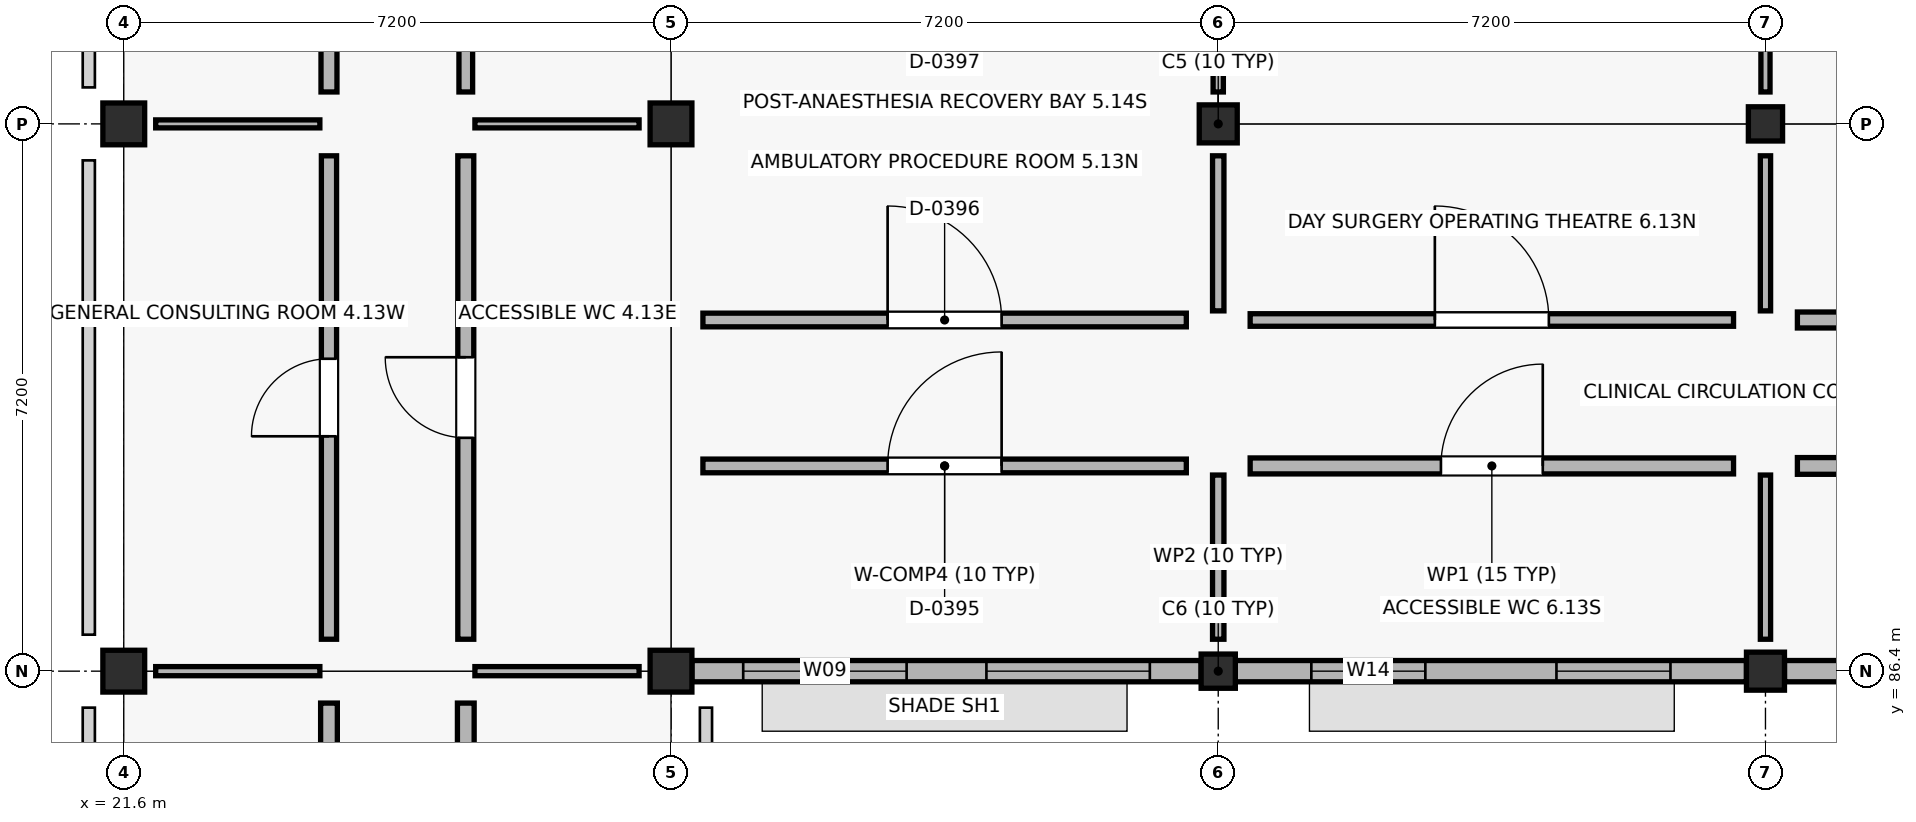
"""IFC4 building model, lengths in metres.
Left out: names, types, materials, properties, quantities, classifications, styles, units other than length and angle.
Written with IfcOpenShell. Run it as: python <this file> out.ifc"""

import sys

from ifc_helpers import new_model, si_unit, direction, frame, frame_2d, origin, origin_2d, place, context, subcontext, project, spatial, rectangle, extrude, element, fill, save


model = new_model("IFC4")
c1 = context("Model", 3, precision=1e-05, world=origin(), true_north=direction((0.0, 1.0)))
c2 = subcontext(c1, "Body", "Model", "MODEL_VIEW")
j1 = project(units=[si_unit("LENGTHUNIT", "METRE"), si_unit("PLANEANGLEUNIT", "RADIAN")], contexts=[c1])
p1 = place(None, origin())
s1 = spatial("IfcSite", under=j1, at=p1, CompositionType="ELEMENT")
p2 = place(p1, origin())
s2 = spatial("IfcBuilding", under=s1, at=p2, CompositionType="ELEMENT")
p3 = place(p2, frame((0.0, 0.0, 9.0)))
s3 = spatial("IfcBuildingStorey", under=s2, at=p3, CompositionType="ELEMENT", Elevation=9.0)
for number, where, z_axis, x_axis in (
    (1, (21.6, 86.4, 0.0), (0.0, 0.0, 1.0), (1.0, 0.0, 0.0)),
    (2, (21.6, 93.6, 0.0), (0.0, 0.0, 1.0), (1.0, 0.0, 0.0)),
    (3, (28.8, 86.4, 0.0), (0.0, 0.0, 1.0), (1.0, 0.0, 0.0)),
    (4, (28.8, 93.6, 0.0), (0.0, 0.0, 1.0), (1.0, 0.0, 0.0)),
):
    element("IfcColumn", number, at=place(p3, frame(where, z_axis=z_axis, x_axis=x_axis)), inside=s3, PredefinedType="COLUMN", context=c2, shape_type="SweptSolid", body=[
        extrude(rectangle(XDim=0.55, YDim=0.55, at=origin_2d()), origin(), (0.0, 0.0, 1.0), 4.5),
    ])
p4 = place(p3, frame((36.0, 86.4, 0.0), z_axis=(0.0, 0.0, 1.0), x_axis=(1.0, 0.0, 0.0)))
e5 = element("IfcColumn", 5, at=p4, inside=s3, PredefinedType="COLUMN", context=c2, shape_type="SweptSolid", body=[
    extrude(rectangle(XDim=0.45, YDim=0.45, at=origin_2d()), origin(), (0.0, 0.0, 1.0), 4.28),
])
for number, where, z_axis, x_axis in (
    (6, (36.0, 93.6, 0.0), (0.0, 0.0, 1.0), (1.0, 0.0, 0.0)),
    (7, (43.2, 86.4, 0.0), (0.0, 0.0, 1.0), (1.0, 0.0, 0.0)),
):
    element("IfcColumn", number, at=place(p3, frame(where, z_axis=z_axis, x_axis=x_axis)), inside=s3, PredefinedType="COLUMN", context=c2, shape_type="SweptSolid", body=[
        extrude(rectangle(XDim=0.5, YDim=0.5, at=origin_2d()), origin(), (0.0, 0.0, 1.0), 4.28),
    ])
p5 = place(p3, frame((43.2, 93.6, 0.0), z_axis=(0.0, 0.0, 1.0), x_axis=(1.0, 0.0, 0.0)))
e8 = element("IfcColumn", 8, at=p5, inside=s3, PredefinedType="COLUMN", context=c2, shape_type="SweptSolid", body=[
    extrude(rectangle(XDim=0.45, YDim=0.45, at=origin_2d()), origin(), (0.0, 0.0, 1.0), 4.28),
])
p6 = place(p3, frame((29.075, 86.4, 0.0), z_axis=(0.0, 0.0, 1.0), x_axis=(1.0, 0.0, 0.0)))
e9 = element("IfcWall", 9, at=p6, inside=s3, PredefinedType="STANDARD", context=c2, shape_type="SweptSolid", body=[
    extrude(rectangle(XDim=6.7, YDim=0.28, at=frame_2d((3.35, 0.0))), origin(), (0.0, 0.0, 1.0), 3.59),
])
p7 = place(p6, frame((0.675, 0.0, 0.9)))
e10 = element("IfcOpeningElement", 10, at=p7, cuts=e9, PredefinedType="OPENING", context=c2, shape_type="SweptSolid", body=[
    extrude(rectangle(XDim=2.15, YDim=1.25, at=frame_2d((1.075, 0.625))), frame((0.0, 0.15, 0.0), z_axis=(0.0, -1.0, 0.0), x_axis=(1.0, 0.0, 0.0)), (0.0, 0.0, 1.0), 0.3),
])
p8 = place(p6, frame((3.875, 0.0, 0.9)))
e11 = element("IfcOpeningElement", 11, at=p8, cuts=e9, PredefinedType="OPENING", context=c2, shape_type="SweptSolid", body=[
    extrude(rectangle(XDim=2.15, YDim=1.25, at=frame_2d((1.075, 0.625))), frame((0.0, 0.15, 0.0), z_axis=(0.0, -1.0, 0.0), x_axis=(1.0, 0.0, 0.0)), (0.0, 0.0, 1.0), 0.3),
])
p9 = place(p3, frame((36.225, 86.4, 0.0), z_axis=(0.0, 0.0, 1.0), x_axis=(1.0, 0.0, 0.0)))
e12 = element("IfcWall", 12, at=p9, inside=s3, PredefinedType="STANDARD", context=c2, shape_type="SweptSolid", body=[
    extrude(rectangle(XDim=6.725, YDim=0.28, at=frame_2d((3.362, 0.0))), origin(), (0.0, 0.0, 1.0), 3.59),
])
p10 = place(p9, frame((1.0, 0.0, 0.9)))
e13 = element("IfcOpeningElement", 13, at=p10, cuts=e12, PredefinedType="OPENING", context=c2, shape_type="SweptSolid", body=[
    extrude(rectangle(XDim=1.5, YDim=1.38, at=frame_2d((0.75, 0.69))), frame((0.0, 0.15, 0.0), z_axis=(0.0, -1.0, 0.0), x_axis=(1.0, 0.0, 0.0)), (0.0, 0.0, 1.0), 0.3),
])
p11 = place(p9, frame((4.225, 0.0, 0.9)))
e14 = element("IfcOpeningElement", 14, at=p11, cuts=e12, PredefinedType="OPENING", context=c2, shape_type="SweptSolid", body=[
    extrude(rectangle(XDim=1.5, YDim=1.38, at=frame_2d((0.75, 0.69))), frame((0.0, 0.15, 0.0), z_axis=(0.0, -1.0, 0.0), x_axis=(1.0, 0.0, 0.0)), (0.0, 0.0, 1.0), 0.3),
])
p12 = place(p3, frame((43.45, 86.4, 0.0), z_axis=(0.0, 0.0, 1.0), x_axis=(1.0, 0.0, 0.0)))
e15 = element("IfcWall", 15, at=p12, inside=s3, PredefinedType="STANDARD", context=c2, shape_type="SweptSolid", body=[
    extrude(rectangle(XDim=6.725, YDim=0.28, at=frame_2d((3.363, 0.0))), origin(), (0.0, 0.0, 1.0), 3.59),
])
p13 = place(p12, frame((1.15, 0.0, 0.9)))
e16 = element("IfcOpeningElement", 16, at=p13, cuts=e15, PredefinedType="OPENING", context=c2, shape_type="SweptSolid", body=[
    extrude(rectangle(XDim=1.2, YDim=1.5, at=frame_2d((0.6, 0.75))), frame((0.0, 0.15, 0.0), z_axis=(0.0, -1.0, 0.0), x_axis=(1.0, 0.0, 0.0)), (0.0, 0.0, 1.0), 0.3),
])
p14 = place(p12, frame((4.375, 0.0, 0.9)))
e17 = element("IfcOpeningElement", 17, at=p14, cuts=e15, PredefinedType="OPENING", context=c2, shape_type="SweptSolid", body=[
    extrude(rectangle(XDim=1.2, YDim=1.5, at=frame_2d((0.6, 0.75))), frame((0.0, 0.15, 0.0), z_axis=(0.0, -1.0, 0.0), x_axis=(1.0, 0.0, 0.0)), (0.0, 0.0, 1.0), 0.3),
])
p15 = place(p3, frame((29.22, 89.1, 0.0), z_axis=(0.0, 0.0, 1.0), x_axis=(1.0, 0.0, 0.0)))
e18 = element("IfcWall", 18, at=p15, inside=s3, PredefinedType="PARTITIONING", context=c2, shape_type="SweptSolid", body=[
    extrude(rectangle(XDim=6.36, YDim=0.18, at=frame_2d((3.18, 0.0))), origin(), (0.0, 0.0, 1.0), 3.38),
])
p16 = place(p15, frame((2.43, 0.0, 0.0)))
e19 = element("IfcOpeningElement", 19, at=p16, cuts=e18, PredefinedType="OPENING", context=c2, shape_type="SweptSolid", body=[
    extrude(rectangle(XDim=1.5, YDim=2.2, at=frame_2d((0.75, 1.1))), frame((0.0, 0.1, 0.0), z_axis=(0.0, -1.0, 0.0), x_axis=(1.0, 0.0, 0.0)), (0.0, 0.0, 1.0), 0.2),
])
p17 = place(p3, frame((36.0, 86.82, 0.0), z_axis=(0.0, 0.0, 1.0), x_axis=(0.0, 1.0, 0.0)))
e20 = element("IfcWall", 20, at=p17, inside=s3, PredefinedType="PARTITIONING", context=c2, shape_type="SweptSolid", body=[
    extrude(rectangle(XDim=2.16, YDim=0.15, at=frame_2d((1.08, 0.0))), origin(), (0.0, 0.0, 1.0), 3.38),
])
p18 = place(p3, frame((29.22, 91.02, 0.0), z_axis=(0.0, 0.0, 1.0), x_axis=(1.0, 0.0, 0.0)))
e21 = element("IfcWall", 21, at=p18, inside=s3, PredefinedType="PARTITIONING", context=c2, shape_type="SweptSolid", body=[
    extrude(rectangle(XDim=6.36, YDim=0.18, at=frame_2d((3.18, 0.0))), origin(), (0.0, 0.0, 1.0), 3.38),
])
p19 = place(p18, frame((2.43, 0.0, 0.0)))
e22 = element("IfcOpeningElement", 22, at=p19, cuts=e21, PredefinedType="OPENING", context=c2, shape_type="SweptSolid", body=[
    extrude(rectangle(XDim=1.5, YDim=2.2, at=frame_2d((0.75, 1.1))), frame((0.0, 0.1, 0.0), z_axis=(0.0, -1.0, 0.0), x_axis=(1.0, 0.0, 0.0)), (0.0, 0.0, 1.0), 0.2),
])
p20 = place(p3, frame((36.0, 91.14, 0.0), z_axis=(0.0, 0.0, 1.0), x_axis=(0.0, 1.0, 0.0)))
e23 = element("IfcWall", 23, at=p20, inside=s3, PredefinedType="PARTITIONING", context=c2, shape_type="SweptSolid", body=[
    extrude(rectangle(XDim=2.04, YDim=0.15, at=frame_2d((1.02, 0.0))), origin(), (0.0, 0.0, 1.0), 3.38),
])
p21 = place(p3, frame((36.0, 94.02, 0.0), z_axis=(0.0, 0.0, 1.0), x_axis=(0.0, 1.0, 0.0)))
e24 = element("IfcWall", 24, at=p21, inside=s3, PredefinedType="PARTITIONING", context=c2, shape_type="SweptSolid", body=[
    extrude(rectangle(XDim=2.16, YDim=0.135, at=frame_2d((1.08, 0.0))), origin(), (0.0, 0.0, 1.0), 3.38),
])
p22 = place(p3, frame((36.42, 89.1, 0.0), z_axis=(0.0, 0.0, 1.0), x_axis=(1.0, 0.0, 0.0)))
e25 = element("IfcWall", 25, at=p22, inside=s3, PredefinedType="PLUMBINGWALL", context=c2, shape_type="SweptSolid", body=[
    extrude(rectangle(XDim=6.36, YDim=0.21, at=frame_2d((3.18, 0.0))), origin(), (0.0, 0.0, 1.0), 3.38),
])
p23 = place(p22, frame((2.51, 0.0, 0.0)))
e26 = element("IfcOpeningElement", 26, at=p23, cuts=e25, PredefinedType="OPENING", context=c2, shape_type="SweptSolid", body=[
    extrude(rectangle(XDim=1.34, YDim=2.14, at=frame_2d((0.67, 1.07))), frame((0.0, 0.115, 0.0), z_axis=(0.0, -1.0, 0.0), x_axis=(1.0, 0.0, 0.0)), (0.0, 0.0, 1.0), 0.23),
])
p24 = place(p3, frame((43.2, 86.82, 0.0), z_axis=(0.0, 0.0, 1.0), x_axis=(0.0, 1.0, 0.0)))
e27 = element("IfcWall", 27, at=p24, inside=s3, PredefinedType="PARTITIONING", context=c2, shape_type="SweptSolid", body=[
    extrude(rectangle(XDim=2.16, YDim=0.135, at=frame_2d((1.08, 0.0))), origin(), (0.0, 0.0, 1.0), 3.38),
])
p25 = place(p3, frame((36.42, 91.02, 0.0), z_axis=(0.0, 0.0, 1.0), x_axis=(1.0, 0.0, 0.0)))
e28 = element("IfcWall", 28, at=p25, inside=s3, PredefinedType="PARTITIONING", context=c2, shape_type="SweptSolid", body=[
    extrude(rectangle(XDim=6.36, YDim=0.165, at=frame_2d((3.18, 0.0))), origin(), (0.0, 0.0, 1.0), 3.38),
])
p26 = place(p25, frame((2.43, 0.0, 0.0)))
e29 = element("IfcOpeningElement", 29, at=p26, cuts=e28, PredefinedType="OPENING", context=c2, shape_type="SweptSolid", body=[
    extrude(rectangle(XDim=1.5, YDim=2.2, at=frame_2d((0.75, 1.1))), frame((0.0, 0.093, 0.0), z_axis=(0.0, -1.0, 0.0), x_axis=(1.0, 0.0, 0.0)), (0.0, 0.0, 1.0), 0.185),
])
p27 = place(p3, frame((43.2, 91.14, 0.0), z_axis=(0.0, 0.0, 1.0), x_axis=(0.0, 1.0, 0.0)))
e30 = element("IfcWall", 30, at=p27, inside=s3, PredefinedType="PARTITIONING", context=c2, shape_type="SweptSolid", body=[
    extrude(rectangle(XDim=2.04, YDim=0.135, at=frame_2d((1.02, 0.0))), origin(), (0.0, 0.0, 1.0), 3.38),
])
p28 = place(p3, frame((43.2, 94.02, 0.0), z_axis=(0.0, 0.0, 1.0), x_axis=(0.0, 1.0, 0.0)))
e31 = element("IfcWall", 31, at=p28, inside=s3, PredefinedType="PARTITIONING", context=c2, shape_type="SweptSolid", body=[
    extrude(rectangle(XDim=2.16, YDim=0.12, at=frame_2d((1.08, 0.0))), origin(), (0.0, 0.0, 1.0), 3.38),
])
p29 = place(p3, frame((43.62, 89.1, 0.0), z_axis=(0.0, 0.0, 1.0), x_axis=(1.0, 0.0, 0.0)))
e32 = element("IfcWall", 32, at=p29, inside=s3, PredefinedType="SOLIDWALL", context=c2, shape_type="SweptSolid", body=[
    extrude(rectangle(XDim=6.36, YDim=0.22, at=frame_2d((3.18, 0.0))), origin(), (0.0, 0.0, 1.0), 3.38),
])
p30 = place(p29, frame((2.67, 0.0, 0.0)))
e33 = element("IfcOpeningElement", 33, at=p30, cuts=e32, PredefinedType="OPENING", context=c2, shape_type="SweptSolid", body=[
    extrude(rectangle(XDim=1.02, YDim=2.19, at=frame_2d((0.51, 1.095))), frame((0.0, 0.12, 0.0), z_axis=(0.0, -1.0, 0.0), x_axis=(1.0, 0.0, 0.0)), (0.0, 0.0, 1.0), 0.24),
])
p31 = place(p3, frame((43.62, 91.02, 0.0), z_axis=(0.0, 0.0, 1.0), x_axis=(1.0, 0.0, 0.0)))
e34 = element("IfcWall", 34, at=p31, inside=s3, PredefinedType="PLUMBINGWALL", context=c2, shape_type="SweptSolid", body=[
    extrude(rectangle(XDim=6.36, YDim=0.21, at=frame_2d((3.18, 0.0))), origin(), (0.0, 0.0, 1.0), 3.38),
])
p32 = place(p31, frame((2.65, 0.0, 0.0)))
e35 = element("IfcOpeningElement", 35, at=p32, cuts=e34, PredefinedType="OPENING", context=c2, shape_type="SweptSolid", body=[
    extrude(rectangle(XDim=1.06, YDim=2.19, at=frame_2d((0.53, 1.095))), frame((0.0, 0.115, 0.0), z_axis=(0.0, -1.0, 0.0), x_axis=(1.0, 0.0, 0.0)), (0.0, 0.0, 1.0), 0.23),
])
p33 = place(p3, frame((24.3, 79.62, 0.0), z_axis=(0.0, 0.0, 1.0), x_axis=(0.0, 1.0, 0.0)))
e36 = element("IfcWall", 36, at=p33, inside=s3, PredefinedType="SOLIDWALL", context=c2, shape_type="SweptSolid", body=[
    extrude(rectangle(XDim=6.36, YDim=0.22, at=frame_2d((3.18, 0.0))), origin(), (0.0, 0.0, 1.0), 3.38),
])
p34 = place(p33, frame((2.71, 0.0, 0.0)))
e37 = element("IfcOpeningElement", 37, at=p34, cuts=e36, PredefinedType="OPENING", context=c2, shape_type="SweptSolid", body=[
    extrude(rectangle(XDim=0.94, YDim=2.14, at=frame_2d((0.47, 1.07))), frame((0.0, 0.12, 0.0), z_axis=(0.0, -1.0, 0.0), x_axis=(1.0, 0.0, 0.0)), (0.0, 0.0, 1.0), 0.24),
])
p35 = place(p3, frame((22.02, 86.4, 0.0), z_axis=(0.0, 0.0, 1.0), x_axis=(1.0, 0.0, 0.0)))
e38 = element("IfcWall", 38, at=p35, inside=s3, PredefinedType="PARTITIONING", context=c2, shape_type="SweptSolid", body=[
    extrude(rectangle(XDim=2.16, YDim=0.12, at=frame_2d((1.08, 0.0))), origin(), (0.0, 0.0, 1.0), 3.38),
])
p36 = place(p3, frame((26.1, 79.62, 0.0), z_axis=(0.0, 0.0, 1.0), x_axis=(0.0, 1.0, 0.0)))
e39 = element("IfcWall", 39, at=p36, inside=s3, PredefinedType="SOLIDWALL", context=c2, shape_type="SweptSolid", body=[
    extrude(rectangle(XDim=6.36, YDim=0.22, at=frame_2d((3.18, 0.0))), origin(), (0.0, 0.0, 1.0), 3.38),
])
p37 = place(p36, frame((2.69, 0.0, 0.0)))
e40 = element("IfcOpeningElement", 40, at=p37, cuts=e39, PredefinedType="OPENING", context=c2, shape_type="SweptSolid", body=[
    extrude(rectangle(XDim=0.98, YDim=2.14, at=frame_2d((0.49, 1.07))), frame((0.0, 0.12, 0.0), z_axis=(0.0, -1.0, 0.0), x_axis=(1.0, 0.0, 0.0)), (0.0, 0.0, 1.0), 0.24),
])
p38 = place(p3, frame((26.22, 86.4, 0.0), z_axis=(0.0, 0.0, 1.0), x_axis=(1.0, 0.0, 0.0)))
e41 = element("IfcWall", 41, at=p38, inside=s3, PredefinedType="PARTITIONING", context=c2, shape_type="SweptSolid", body=[
    extrude(rectangle(XDim=2.16, YDim=0.12, at=frame_2d((1.08, 0.0))), origin(), (0.0, 0.0, 1.0), 3.38),
])
p39 = place(p3, frame((24.3, 86.82, 0.0), z_axis=(0.0, 0.0, 1.0), x_axis=(0.0, 1.0, 0.0)))
e42 = element("IfcWall", 42, at=p39, inside=s3, PredefinedType="SOLIDWALL", context=c2, shape_type="SweptSolid", body=[
    extrude(rectangle(XDim=6.36, YDim=0.2, at=frame_2d((3.18, 0.0))), origin(), (0.0, 0.0, 1.0), 3.38),
])
p40 = place(p39, frame((2.67, 0.0, 0.0)))
e43 = element("IfcOpeningElement", 43, at=p40, cuts=e42, PredefinedType="OPENING", context=c2, shape_type="SweptSolid", body=[
    extrude(rectangle(XDim=1.02, YDim=2.14, at=frame_2d((0.51, 1.07))), frame((0.0, 0.11, 0.0), z_axis=(0.0, -1.0, 0.0), x_axis=(1.0, 0.0, 0.0)), (0.0, 0.0, 1.0), 0.22),
])
p41 = place(p3, frame((22.02, 93.6, 0.0), z_axis=(0.0, 0.0, 1.0), x_axis=(1.0, 0.0, 0.0)))
e44 = element("IfcWall", 44, at=p41, inside=s3, PredefinedType="PARTITIONING", context=c2, shape_type="SweptSolid", body=[
    extrude(rectangle(XDim=2.16, YDim=0.105, at=frame_2d((1.08, 0.0))), origin(), (0.0, 0.0, 1.0), 3.38),
])
p42 = place(p3, frame((26.1, 86.82, 0.0), z_axis=(0.0, 0.0, 1.0), x_axis=(0.0, 1.0, 0.0)))
e45 = element("IfcWall", 45, at=p42, inside=s3, PredefinedType="PLUMBINGWALL", context=c2, shape_type="SweptSolid", body=[
    extrude(rectangle(XDim=6.36, YDim=0.21, at=frame_2d((3.18, 0.0))), origin(), (0.0, 0.0, 1.0), 3.38),
])
p43 = place(p42, frame((2.65, 0.0, 0.0)))
e46 = element("IfcOpeningElement", 46, at=p43, cuts=e45, PredefinedType="OPENING", context=c2, shape_type="SweptSolid", body=[
    extrude(rectangle(XDim=1.06, YDim=2.14, at=frame_2d((0.53, 1.07))), frame((0.0, 0.115, 0.0), z_axis=(0.0, -1.0, 0.0), x_axis=(1.0, 0.0, 0.0)), (0.0, 0.0, 1.0), 0.23),
])
p44 = place(p3, frame((26.22, 93.6, 0.0), z_axis=(0.0, 0.0, 1.0), x_axis=(1.0, 0.0, 0.0)))
e47 = element("IfcWall", 47, at=p44, inside=s3, PredefinedType="PARTITIONING", context=c2, shape_type="SweptSolid", body=[
    extrude(rectangle(XDim=2.16, YDim=0.105, at=frame_2d((1.08, 0.0))), origin(), (0.0, 0.0, 1.0), 3.38),
])
p45 = place(p3, frame((24.3, 94.02, 0.0), z_axis=(0.0, 0.0, 1.0), x_axis=(0.0, 1.0, 0.0)))
e48 = element("IfcWall", 48, at=p45, inside=s3, PredefinedType="PLUMBINGWALL", context=c2, shape_type="SweptSolid", body=[
    extrude(rectangle(XDim=6.36, YDim=0.21, at=frame_2d((3.18, 0.0))), origin(), (0.0, 0.0, 1.0), 3.38),
])
p46 = place(p45, frame((2.63, 0.0, 0.0)))
e49 = element("IfcOpeningElement", 49, at=p46, cuts=e48, PredefinedType="OPENING", context=c2, shape_type="SweptSolid", body=[
    extrude(rectangle(XDim=1.1, YDim=2.14, at=frame_2d((0.55, 1.07))), frame((0.0, 0.115, 0.0), z_axis=(0.0, -1.0, 0.0), x_axis=(1.0, 0.0, 0.0)), (0.0, 0.0, 1.0), 0.23),
])
p47 = place(p3, frame((26.1, 94.02, 0.0), z_axis=(0.0, 0.0, 1.0), x_axis=(0.0, 1.0, 0.0)))
e50 = element("IfcWall", 50, at=p47, inside=s3, PredefinedType="PARTITIONING", context=c2, shape_type="SweptSolid", body=[
    extrude(rectangle(XDim=6.36, YDim=0.18, at=frame_2d((3.18, 0.0))), origin(), (0.0, 0.0, 1.0), 3.38),
])
p48 = place(p47, frame((2.61, 0.0, 0.0)))
e51 = element("IfcOpeningElement", 51, at=p48, cuts=e50, PredefinedType="OPENING", context=c2, shape_type="SweptSolid", body=[
    extrude(rectangle(XDim=1.14, YDim=2.14, at=frame_2d((0.57, 1.07))), frame((0.0, 0.1, 0.0), z_axis=(0.0, -1.0, 0.0), x_axis=(1.0, 0.0, 0.0)), (0.0, 0.0, 1.0), 0.2),
])
p49 = place(p7, origin())
e52 = element("IfcWindow", 52, at=p49, inside=s3, PartitioningType="SINGLE_PANEL", PredefinedType="WINDOW", context=c2, shape_type="SweptSolid", body=[
    extrude(rectangle(XDim=2.15, YDim=1.25, at=frame_2d((1.075, 0.625))), frame((0.0, 0.03, 0.0), z_axis=(0.0, -1.0, 0.0), x_axis=(1.0, 0.0, 0.0)), (0.0, 0.0, 1.0), 0.06),
])
fill(e10, e52)
p50 = place(p8, origin())
e53 = element("IfcWindow", 53, at=p50, inside=s3, PartitioningType="SINGLE_PANEL", PredefinedType="WINDOW", context=c2, shape_type="SweptSolid", body=[
    extrude(rectangle(XDim=2.15, YDim=1.25, at=frame_2d((1.075, 0.625))), frame((0.0, 0.03, 0.0), z_axis=(0.0, -1.0, 0.0), x_axis=(1.0, 0.0, 0.0)), (0.0, 0.0, 1.0), 0.06),
])
fill(e11, e53)
p51 = place(p10, origin())
e54 = element("IfcWindow", 54, at=p51, inside=s3, PartitioningType="SINGLE_PANEL", PredefinedType="WINDOW", context=c2, shape_type="SweptSolid", body=[
    extrude(rectangle(XDim=1.5, YDim=1.38, at=frame_2d((0.75, 0.69))), frame((0.0, 0.03, 0.0), z_axis=(0.0, -1.0, 0.0), x_axis=(1.0, 0.0, 0.0)), (0.0, 0.0, 1.0), 0.06),
])
fill(e13, e54)
p52 = place(p11, origin())
e55 = element("IfcWindow", 55, at=p52, inside=s3, PartitioningType="SINGLE_PANEL", PredefinedType="WINDOW", context=c2, shape_type="SweptSolid", body=[
    extrude(rectangle(XDim=1.5, YDim=1.38, at=frame_2d((0.75, 0.69))), frame((0.0, 0.03, 0.0), z_axis=(0.0, -1.0, 0.0), x_axis=(1.0, 0.0, 0.0)), (0.0, 0.0, 1.0), 0.06),
])
fill(e14, e55)
p53 = place(p16, origin())
e56 = element("IfcDoor", 56, at=p53, inside=s3, OperationType="SINGLE_SWING_RIGHT", PredefinedType="DOOR", context=c2, shape_type="SweptSolid", body=[
    extrude(rectangle(XDim=1.5, YDim=2.2, at=frame_2d((0.75, 1.1))), frame((0.0, 0.025, 0.0), z_axis=(0.0, -1.0, 0.0), x_axis=(1.0, 0.0, 0.0)), (0.0, 0.0, 1.0), 0.05),
])
fill(e19, e56)
p54 = place(p19, origin())
e57 = element("IfcDoor", 57, at=p54, inside=s3, OperationType="SINGLE_SWING_LEFT", PredefinedType="DOOR", context=c2, shape_type="SweptSolid", body=[
    extrude(rectangle(XDim=1.5, YDim=2.2, at=frame_2d((0.75, 1.1))), frame((0.0, 0.025, 0.0), z_axis=(0.0, -1.0, 0.0), x_axis=(1.0, 0.0, 0.0)), (0.0, 0.0, 1.0), 0.05),
])
fill(e22, e57)
p55 = place(p23, origin())
e58 = element("IfcDoor", 58, at=p55, inside=s3, OperationType="SINGLE_SWING_RIGHT", PredefinedType="DOOR", context=c2, shape_type="SweptSolid", body=[
    extrude(rectangle(XDim=1.34, YDim=2.14, at=frame_2d((0.67, 1.07))), frame((0.0, 0.025, 0.0), z_axis=(0.0, -1.0, 0.0), x_axis=(1.0, 0.0, 0.0)), (0.0, 0.0, 1.0), 0.05),
])
fill(e26, e58)
p56 = place(p26, origin())
e59 = element("IfcDoor", 59, at=p56, inside=s3, OperationType="SINGLE_SWING_LEFT", PredefinedType="DOOR", context=c2, shape_type="SweptSolid", body=[
    extrude(rectangle(XDim=1.5, YDim=2.2, at=frame_2d((0.75, 1.1))), frame((0.0, 0.025, 0.0), z_axis=(0.0, -1.0, 0.0), x_axis=(1.0, 0.0, 0.0)), (0.0, 0.0, 1.0), 0.05),
])
fill(e29, e59)
p57 = place(p40, origin())
e60 = element("IfcDoor", 60, at=p57, inside=s3, OperationType="SINGLE_SWING_LEFT", PredefinedType="DOOR", context=c2, shape_type="SweptSolid", body=[
    extrude(rectangle(XDim=1.02, YDim=2.14, at=frame_2d((0.51, 1.07))), frame((0.0, 0.025, 0.0), z_axis=(0.0, -1.0, 0.0), x_axis=(1.0, 0.0, 0.0)), (0.0, 0.0, 1.0), 0.05),
])
fill(e43, e60)
p58 = place(p43, origin())
e61 = element("IfcDoor", 61, at=p58, inside=s3, OperationType="SINGLE_SWING_RIGHT", PredefinedType="DOOR", context=c2, shape_type="SweptSolid", body=[
    extrude(rectangle(XDim=1.06, YDim=2.14, at=frame_2d((0.53, 1.07))), frame((0.0, 0.025, 0.0), z_axis=(0.0, -1.0, 0.0), x_axis=(1.0, 0.0, 0.0)), (0.0, 0.0, 1.0), 0.05),
])
fill(e46, e61)
save(model, sys.argv[1])
